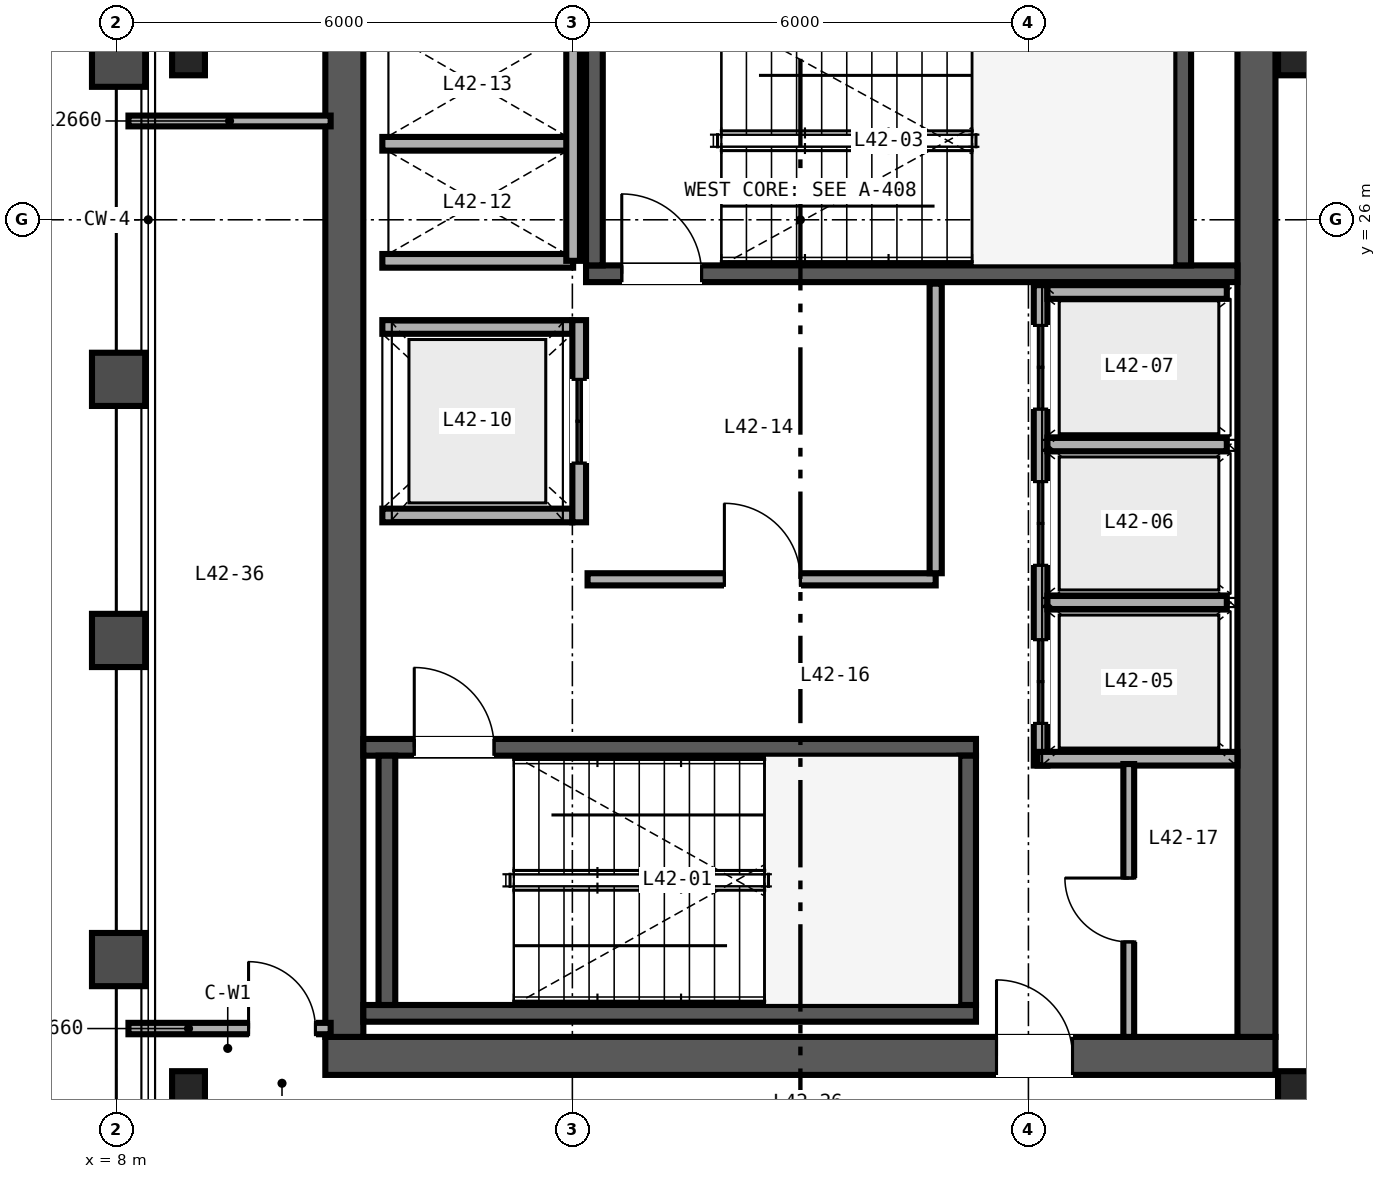
"""IFC4 building model, lengths in metres.
Left out: names, types, materials, properties, quantities, classifications, styles, units other than length and angle.
Written with IfcOpenShell. Run it as: python <this file> out.ifc"""

import sys

from ifc_helpers import new_model, si_unit, direction, frame, frame_2d, origin, origin_2d, place, context, subcontext, project, spatial, rectangle, i_section, extrude, source, transform, mapped, element, fill, save


model = new_model("IFC4")
c1 = context("Model", 3, precision=1e-05, world=origin(), true_north=direction((0.0, 1.0)))
c2 = subcontext(c1, "Body", "Model", "MODEL_VIEW")
j1 = project(units=[si_unit("LENGTHUNIT", "METRE"), si_unit("PLANEANGLEUNIT", "RADIAN")], contexts=[c1])
p1 = place(None, origin())
s1 = spatial("IfcSite", under=j1, at=p1, CompositionType="ELEMENT")
p2 = place(p1, origin())
s2 = spatial("IfcBuilding", under=s1, at=p2, CompositionType="ELEMENT")
p3 = place(p2, frame((0.0, 0.0, 170.4)))
s3 = spatial("IfcBuildingStorey", under=s2, at=p3, CompositionType="ELEMENT", Elevation=170.4)
p4 = place(p3, frame((10.75, 15.0, 0.0), z_axis=(0.0, 0.0, 1.0), x_axis=(1.0, 0.0, 0.0)))
e1 = element("IfcWall", 1, at=p4, inside=s3, PredefinedType="SHEAR", context=c2, shape_type="SweptSolid", body=[
    extrude(rectangle(XDim=12.5, YDim=0.5, at=frame_2d((6.25, 0.0))), origin(), (0.0, 0.0, 1.0), 3.37),
])
p5 = place(p4, frame((8.83, 0.0, 0.0)))
e2 = element("IfcOpeningElement", 2, at=p5, cuts=e1, PredefinedType="OPENING", context=c2, shape_type="SweptSolid", body=[
    extrude(rectangle(XDim=1.0, YDim=2.15, at=frame_2d((0.5, 1.075))), frame((0.0, 0.26, 0.0), z_axis=(0.0, -1.0, 0.0), x_axis=(1.0, 0.0, 0.0)), (0.0, 0.0, 1.0), 0.52),
])
for number, where, z_axis, x_axis in (
    (3, (11.0, 15.25, 0.0), (0.0, 0.0, 1.0), (0.0, 1.0, 0.0)),
    (4, (23.0, 15.25, 0.0), (0.0, 0.0, 1.0), (0.0, 1.0, 0.0)),
):
    element("IfcWall", number, at=place(p3, frame(where, z_axis=z_axis, x_axis=x_axis)), inside=s3, PredefinedType="SHEAR", context=c2, shape_type="SweptSolid", body=[
        extrude(rectangle(XDim=21.5, YDim=0.5, at=frame_2d((10.75, 0.0))), origin(), (0.0, 0.0, 1.0), 3.37),
    ])
p6 = place(p3, frame((11.25, 15.56, 0.0), z_axis=(0.0, 0.0, 1.0), x_axis=(1.0, 0.0, 0.0)))
e5 = element("IfcWall", 5, at=p6, inside=s3, PredefinedType="SHEAR", context=c2, shape_type="SweptSolid", body=[
    extrude(rectangle(XDim=8.06, YDim=0.22, at=frame_2d((4.03, 0.0))), origin(), (0.0, 0.0, 1.0), 3.4),
])
p7 = place(p3, frame((11.25, 19.06, 0.0), z_axis=(0.0, 0.0, 1.0), x_axis=(1.0, 0.0, 0.0)))
e6 = element("IfcWall", 6, at=p7, inside=s3, PredefinedType="SHEAR", context=c2, shape_type="SweptSolid", body=[
    extrude(rectangle(XDim=8.06, YDim=0.22, at=frame_2d((4.03, 0.0))), origin(), (0.0, 0.0, 1.0), 3.4),
])
p8 = place(p7, frame((0.67, 0.0, 0.0)))
e7 = element("IfcOpeningElement", 7, at=p8, cuts=e6, PredefinedType="OPENING", context=c2, shape_type="SweptSolid", body=[
    extrude(rectangle(XDim=1.05, YDim=2.15, at=frame_2d((0.525, 1.075))), frame((0.0, 0.12, 0.0), z_axis=(0.0, -1.0, 0.0), x_axis=(1.0, 0.0, 0.0)), (0.0, 0.0, 1.0), 0.24),
])
for number, where, z_axis, x_axis in (
    (8, (11.56, 15.67, 0.0), (0.0, 0.0, 1.0), (0.0, 1.0, 0.0)),
    (9, (19.2, 15.67, 0.0), (0.0, 0.0, 1.0), (0.0, 1.0, 0.0)),
):
    element("IfcWall", number, at=place(p3, frame(where, z_axis=z_axis, x_axis=x_axis)), inside=s3, PredefinedType="SHEAR", context=c2, shape_type="SweptSolid", body=[
        extrude(rectangle(XDim=3.28, YDim=0.22, at=frame_2d((1.64, 0.0))), origin(), (0.0, 0.0, 1.0), 3.4),
    ])
p9 = place(p3, frame((14.18, 25.29, 0.0), z_axis=(0.0, 0.0, 1.0), x_axis=(1.0, 0.0, 0.0)))
e10 = element("IfcWall", 10, at=p9, inside=s3, PredefinedType="SHEAR", context=c2, shape_type="SweptSolid", body=[
    extrude(rectangle(XDim=8.57, YDim=0.22, at=frame_2d((4.285, 0.0))), origin(), (0.0, 0.0, 1.0), 3.4),
])
p10 = place(p9, frame((0.47, 0.0, 0.0)))
e11 = element("IfcOpeningElement", 11, at=p10, cuts=e10, PredefinedType="OPENING", context=c2, shape_type="SweptSolid", body=[
    extrude(rectangle(XDim=1.05, YDim=2.15, at=frame_2d((0.525, 1.075))), frame((0.0, 0.12, 0.0), z_axis=(0.0, -1.0, 0.0), x_axis=(1.0, 0.0, 0.0)), (0.0, 0.0, 1.0), 0.24),
])
for number, where, z_axis, x_axis in (
    (12, (14.29, 25.4, 0.0), (0.0, 0.0, 1.0), (0.0, 1.0, 0.0)),
    (13, (22.03, 25.4, 0.0), (0.0, 0.0, 1.0), (0.0, 1.0, 0.0)),
):
    element("IfcWall", number, at=place(p3, frame(where, z_axis=z_axis, x_axis=x_axis)), inside=s3, PredefinedType="SHEAR", context=c2, shape_type="SweptSolid", body=[
        extrude(rectangle(XDim=3.28, YDim=0.22, at=frame_2d((1.64, 0.0))), origin(), (0.0, 0.0, 1.0), 3.4),
    ])
m1 = source(origin(), c2, "Body", "SweptSolid", [
    extrude(i_section(OverallWidth=0.432, OverallDepth=0.498, WebThickness=0.056, FlangeThickness=0.089, FilletRadius=0.025, at=origin_2d()), origin(), (0.0, 0.0, 1.0), 3.37),
])
for number, where, z_axis, x_axis in (
    (14, (8.95, 14.55, 0.0), (0.0, 0.0, 1.0), (1.0, 0.0, 0.0)),
    (15, (23.5, 14.55, 0.0), (0.0, 0.0, 1.0), (1.0, 0.0, 0.0)),
    (16, (8.95, 28.15, 0.0), (0.0, 0.0, 1.0), (1.0, 0.0, 0.0)),
    (17, (23.5, 28.15, 0.0), (0.0, 0.0, 1.0), (1.0, 0.0, 0.0)),
):
    element("IfcColumn", number, at=place(p3, frame(where, z_axis=z_axis, x_axis=x_axis)), inside=s3, PredefinedType="COLUMN", context=c2, shape_type="MappedRepresentation", body=[
        mapped(m1, transform((0.0, 0.0, 0.0), scale=1.0)),
    ])
p11 = place(p3, frame((20.16, 18.82, 0.0), z_axis=(0.0, 0.0, 1.0), x_axis=(0.0, 1.0, 0.0)))
e18 = element("IfcWall", 18, at=p11, inside=s3, PredefinedType="SOLIDWALL", context=c2, shape_type="SweptSolid", body=[
    extrude(rectangle(XDim=6.32, YDim=0.18, at=frame_2d((3.16, 0.0))), origin(), (0.0, 0.0, 1.0), 2.47),
])
p12 = place(p11, frame((0.555, 0.0, 0.0)))
e19 = element("IfcOpeningElement", 19, at=p12, cuts=e18, PredefinedType="OPENING", context=c2, shape_type="SweptSolid", body=[
    extrude(rectangle(XDim=1.1, YDim=2.2, at=frame_2d((0.55, 1.1))), frame((0.0, 0.1, 0.0), z_axis=(0.0, -1.0, 0.0), x_axis=(1.0, 0.0, 0.0)), (0.0, 0.0, 1.0), 0.2),
])
p13 = place(p11, frame((2.635, 0.0, 0.0)))
e20 = element("IfcOpeningElement", 20, at=p13, cuts=e18, PredefinedType="OPENING", context=c2, shape_type="SweptSolid", body=[
    extrude(rectangle(XDim=1.1, YDim=2.2, at=frame_2d((0.55, 1.1))), frame((0.0, 0.1, 0.0), z_axis=(0.0, -1.0, 0.0), x_axis=(1.0, 0.0, 0.0)), (0.0, 0.0, 1.0), 0.2),
])
p14 = place(p11, frame((4.69, 0.0, 0.0)))
e21 = element("IfcOpeningElement", 21, at=p14, cuts=e18, PredefinedType="OPENING", context=c2, shape_type="SweptSolid", body=[
    extrude(rectangle(XDim=1.1, YDim=2.2, at=frame_2d((0.55, 1.1))), frame((0.0, 0.1, 0.0), z_axis=(0.0, -1.0, 0.0), x_axis=(1.0, 0.0, 0.0)), (0.0, 0.0, 1.0), 0.2),
])
p15 = place(p3, frame((20.12, 18.91, 0.0), z_axis=(0.0, 0.0, 1.0), x_axis=(1.0, 0.0, 0.0)))
e22 = element("IfcWall", 22, at=p15, inside=s3, PredefinedType="SOLIDWALL", context=c2, shape_type="SweptSolid", body=[
    extrude(rectangle(XDim=2.63, YDim=0.18, at=frame_2d((1.315, 0.0))), origin(), (0.0, 0.0, 1.0), 3.37),
])
p16 = place(p3, frame((20.25, 25.05, 0.0), z_axis=(0.0, 0.0, 1.0), x_axis=(1.0, 0.0, 0.0)))
e23 = element("IfcWall", 23, at=p16, inside=s3, PredefinedType="SOLIDWALL", context=c2, shape_type="SweptSolid", body=[
    extrude(rectangle(XDim=2.36, YDim=0.18, at=frame_2d((1.18, 0.0))), origin(), (0.0, 0.0, 1.0), 3.37),
])
p17 = place(p3, frame((20.25, 20.965, 0.0), z_axis=(0.0, 0.0, 1.0), x_axis=(1.0, 0.0, 0.0)))
e24 = element("IfcWall", 24, at=p17, inside=s3, PredefinedType="SOLIDWALL", context=c2, shape_type="SweptSolid", body=[
    extrude(rectangle(XDim=2.36, YDim=0.18, at=frame_2d((1.18, 0.0))), origin(), (0.0, 0.0, 1.0), 2.47),
])
p18 = place(p3, frame((20.25, 23.045, 0.0), z_axis=(0.0, 0.0, 1.0), x_axis=(1.0, 0.0, 0.0)))
e25 = element("IfcWall", 25, at=p18, inside=s3, PredefinedType="SOLIDWALL", context=c2, shape_type="SweptSolid", body=[
    extrude(rectangle(XDim=2.36, YDim=0.18, at=frame_2d((1.18, 0.0))), origin(), (0.0, 0.0, 1.0), 3.37),
])
for number, where, z_axis, x_axis in (
    (26, (11.5, 22.11, 0.0), (0.0, 0.0, 1.0), (1.0, 0.0, 0.0)),
    (27, (11.5, 24.59, 0.0), (0.0, 0.0, 1.0), (1.0, 0.0, 0.0)),
):
    element("IfcWall", number, at=place(p3, frame(where, z_axis=z_axis, x_axis=x_axis)), inside=s3, PredefinedType="SOLIDWALL", context=c2, shape_type="SweptSolid", body=[
        extrude(rectangle(XDim=2.5, YDim=0.18, at=frame_2d((1.25, 0.0))), origin(), (0.0, 0.0, 1.0), 3.37),
    ])
p19 = place(p3, frame((14.09, 22.02, 0.0), z_axis=(0.0, 0.0, 1.0), x_axis=(0.0, 1.0, 0.0)))
e28 = element("IfcWall", 28, at=p19, inside=s3, PredefinedType="SOLIDWALL", context=c2, shape_type="SweptSolid", body=[
    extrude(rectangle(XDim=2.66, YDim=0.18, at=frame_2d((1.33, 0.0))), origin(), (0.0, 0.0, 1.0), 3.37),
])
p20 = place(p19, frame((0.78, 0.0, 0.0)))
e29 = element("IfcOpeningElement", 29, at=p20, cuts=e28, PredefinedType="OPENING", context=c2, shape_type="SweptSolid", body=[
    extrude(rectangle(XDim=1.1, YDim=2.2, at=frame_2d((0.55, 1.1))), frame((0.0, 0.1, 0.0), z_axis=(0.0, -1.0, 0.0), x_axis=(1.0, 0.0, 0.0)), (0.0, 0.0, 1.0), 0.2),
])
for number, where, z_axis, x_axis in (
    (30, (11.5, 25.46, 0.0), (0.0, 0.0, 1.0), (1.0, 0.0, 0.0)),
    (31, (11.5, 27.0, 0.0), (0.0, 0.0, 1.0), (1.0, 0.0, 0.0)),
):
    element("IfcWall", number, at=place(p3, frame(where, z_axis=z_axis, x_axis=x_axis)), inside=s3, PredefinedType="SOLIDWALL", context=c2, shape_type="SweptSolid", body=[
        extrude(rectangle(XDim=2.51, YDim=0.18, at=frame_2d((1.255, 0.0))), origin(), (0.0, 0.0, 1.0), 3.37),
    ])
p21 = place(p3, frame((14.01, 25.46, 0.0), z_axis=(0.0, 0.0, 1.0), x_axis=(0.0, 1.0, 0.0)))
e32 = element("IfcWall", 32, at=p21, inside=s3, PredefinedType="SOLIDWALL", context=c2, shape_type="SweptSolid", body=[
    extrude(rectangle(XDim=3.08, YDim=0.18, at=frame_2d((1.54, 0.0))), origin(), (0.0, 0.0, 1.0), 3.37),
])
p22 = place(p3, frame((14.2, 21.27, 0.0), z_axis=(0.0, 0.0, 1.0), x_axis=(1.0, 0.0, 0.0)))
e33 = element("IfcWall", 33, at=p22, inside=s3, PredefinedType="PARTITIONING", context=c2, shape_type="SweptSolid", body=[
    extrude(rectangle(XDim=4.58, YDim=0.16, at=frame_2d((2.29, 0.0))), origin(), (0.0, 0.0, 1.0), 3.37),
])
p23 = place(p22, frame((1.8, 0.0, 0.0)))
e34 = element("IfcOpeningElement", 34, at=p23, cuts=e33, PredefinedType="OPENING", context=c2, shape_type="SweptSolid", body=[
    extrude(rectangle(XDim=1.0, YDim=2.15, at=frame_2d((0.5, 1.075))), frame((0.0, 0.09, 0.0), z_axis=(0.0, -1.0, 0.0), x_axis=(1.0, 0.0, 0.0)), (0.0, 0.0, 1.0), 0.18),
])
p24 = place(p3, frame((18.78, 21.35, 0.0), z_axis=(0.0, 0.0, 1.0), x_axis=(0.0, 1.0, 0.0)))
e35 = element("IfcWall", 35, at=p24, inside=s3, PredefinedType="PARTITIONING", context=c2, shape_type="SweptSolid", body=[
    extrude(rectangle(XDim=3.81, YDim=0.16, at=frame_2d((1.905, 0.0))), origin(), (0.0, 0.0, 1.0), 3.37),
])
p25 = place(p3, frame((21.32, 15.25, 0.0), z_axis=(0.0, 0.0, 1.0), x_axis=(0.0, 1.0, 0.0)))
e36 = element("IfcWall", 36, at=p25, inside=s3, PredefinedType="PARTITIONING", context=c2, shape_type="SweptSolid", body=[
    extrude(rectangle(XDim=3.59, YDim=0.142, at=frame_2d((1.795, 0.0))), origin(), (0.0, 0.0, 1.0), 3.37),
])
p26 = place(p25, frame((1.25, 0.0, 0.0)))
e37 = element("IfcOpeningElement", 37, at=p26, cuts=e36, PredefinedType="OPENING", context=c2, shape_type="SweptSolid", body=[
    extrude(rectangle(XDim=0.84, YDim=2.1, at=frame_2d((0.42, 1.05))), frame((0.0, 0.081, 0.0), z_axis=(0.0, -1.0, 0.0), x_axis=(1.0, 0.0, 0.0)), (0.0, 0.0, 1.0), 0.162),
])
p27 = place(p3, frame((8.16, 15.36, 0.0), z_axis=(0.0, 0.0, 1.0), x_axis=(1.0, 0.0, 0.0)))
e38 = element("IfcWall", 38, at=p27, inside=s3, PredefinedType="PARTITIONING", context=c2, shape_type="SweptSolid", body=[
    extrude(rectangle(XDim=2.66, YDim=0.15, at=frame_2d((1.33, 0.0))), origin(), (0.0, 0.0, 1.0), 2.591),
])
p28 = place(p27, frame((1.58, 0.0, 0.0)))
e39 = element("IfcOpeningElement", 39, at=p28, cuts=e38, PredefinedType="OPENING", context=c2, shape_type="SweptSolid", body=[
    extrude(rectangle(XDim=0.88, YDim=2.15, at=frame_2d((0.44, 1.075))), frame((0.0, 0.085, 0.0), z_axis=(0.0, -1.0, 0.0), x_axis=(1.0, 0.0, 0.0)), (0.0, 0.0, 1.0), 0.17),
])
p29 = place(p3, frame((8.16, 27.3, 0.0), z_axis=(0.0, 0.0, 1.0), x_axis=(1.0, 0.0, 0.0)))
e40 = element("IfcWall", 40, at=p29, inside=s3, PredefinedType="PARTITIONING", context=c2, shape_type="SweptSolid", body=[
    extrude(rectangle(XDim=2.66, YDim=0.142, at=frame_2d((1.33, 0.0))), origin(), (0.0, 0.0, 1.0), 2.591),
])
m2 = source(origin(), c2, "Body", "SweptSolid", [
    extrude(rectangle(XDim=1.05, YDim=2.15, at=frame_2d((0.525, 1.075))), frame((0.0, 0.025, 0.0), z_axis=(0.0, -1.0, 0.0), x_axis=(1.0, 0.0, 0.0)), (0.0, 0.0, 1.0), 0.05),
])
p30 = place(p8, origin())
e41 = element("IfcDoor", 41, at=p30, inside=s3, OperationType="SINGLE_SWING_LEFT", PredefinedType="DOOR", context=c2, shape_type="MappedRepresentation", body=[
    mapped(m2, transform((0.0, 0.0, 0.0), scale=1.0)),
])
fill(e7, e41)
p31 = place(p10, origin())
e42 = element("IfcDoor", 42, at=p31, inside=s3, OperationType="SINGLE_SWING_LEFT", PredefinedType="DOOR", context=c2, shape_type="MappedRepresentation", body=[
    mapped(m2, transform((0.0, 0.0, 0.0), scale=1.0)),
])
fill(e11, e42)
m3 = source(origin(), c2, "Body", "SweptSolid", [
    extrude(rectangle(XDim=1.1, YDim=2.2, at=frame_2d((0.55, 1.1))), frame((0.0, 0.025, 0.0), z_axis=(0.0, -1.0, 0.0), x_axis=(1.0, 0.0, 0.0)), (0.0, 0.0, 1.0), 0.05),
])
p32 = place(p12, origin())
e43 = element("IfcDoor", 43, at=p32, inside=s3, OperationType="DOUBLE_DOOR_SLIDING", PredefinedType="DOOR", context=c2, shape_type="MappedRepresentation", body=[
    mapped(m3, transform((0.0, 0.0, 0.0), scale=1.0)),
])
fill(e19, e43)
p33 = place(p13, origin())
e44 = element("IfcDoor", 44, at=p33, inside=s3, OperationType="DOUBLE_DOOR_SLIDING", PredefinedType="DOOR", context=c2, shape_type="MappedRepresentation", body=[
    mapped(m3, transform((0.0, 0.0, 0.0), scale=1.0)),
])
fill(e20, e44)
p34 = place(p14, origin())
e45 = element("IfcDoor", 45, at=p34, inside=s3, OperationType="DOUBLE_DOOR_SLIDING", PredefinedType="DOOR", context=c2, shape_type="MappedRepresentation", body=[
    mapped(m3, transform((0.0, 0.0, 0.0), scale=1.0)),
])
fill(e21, e45)
p35 = place(p20, origin())
e46 = element("IfcDoor", 46, at=p35, inside=s3, OperationType="DOUBLE_DOOR_SLIDING", PredefinedType="DOOR", context=c2, shape_type="MappedRepresentation", body=[
    mapped(m3, transform((0.0, 0.0, 0.0), scale=1.0)),
])
fill(e29, e46)
m4 = source(origin(), c2, "Body", "SweptSolid", [
    extrude(rectangle(XDim=1.0, YDim=2.15, at=frame_2d((0.5, 1.075))), frame((0.0, 0.025, 0.0), z_axis=(0.0, -1.0, 0.0), x_axis=(1.0, 0.0, 0.0)), (0.0, 0.0, 1.0), 0.05),
])
p36 = place(p23, origin())
e47 = element("IfcDoor", 47, at=p36, inside=s3, OperationType="SINGLE_SWING_LEFT", PredefinedType="DOOR", context=c2, shape_type="MappedRepresentation", body=[
    mapped(m4, transform((0.0, 0.0, 0.0), scale=1.0)),
])
fill(e34, e47)
m5 = source(origin(), c2, "Body", "SweptSolid", [
    extrude(rectangle(XDim=0.84, YDim=2.1, at=frame_2d((0.42, 1.05))), frame((0.0, 0.025, 0.0), z_axis=(0.0, -1.0, 0.0), x_axis=(1.0, 0.0, 0.0)), (0.0, 0.0, 1.0), 0.05),
])
p37 = place(p26, origin())
e48 = element("IfcDoor", 48, at=p37, inside=s3, OperationType="SINGLE_SWING_RIGHT", PredefinedType="DOOR", context=c2, shape_type="MappedRepresentation", body=[
    mapped(m5, transform((0.0, 0.0, 0.0), scale=1.0)),
])
fill(e37, e48)
p38 = place(p5, origin())
e49 = element("IfcDoor", 49, at=p38, inside=s3, OperationType="SINGLE_SWING_LEFT", PredefinedType="DOOR", context=c2, shape_type="MappedRepresentation", body=[
    mapped(m4, transform((0.0, 0.0, 0.0), scale=1.0)),
])
fill(e2, e49)
m6 = source(origin(), c2, "Body", "SweptSolid", [
    extrude(rectangle(XDim=0.88, YDim=2.15, at=frame_2d((0.44, 1.075))), frame((0.0, 0.025, 0.0), z_axis=(0.0, -1.0, 0.0), x_axis=(1.0, 0.0, 0.0)), (0.0, 0.0, 1.0), 0.05),
])
p39 = place(p28, origin())
e50 = element("IfcDoor", 50, at=p39, inside=s3, OperationType="SINGLE_SWING_LEFT", PredefinedType="DOOR", context=c2, shape_type="MappedRepresentation", body=[
    mapped(m6, transform((0.0, 0.0, 0.0), scale=1.0)),
])
fill(e39, e50)
save(model, sys.argv[1])
